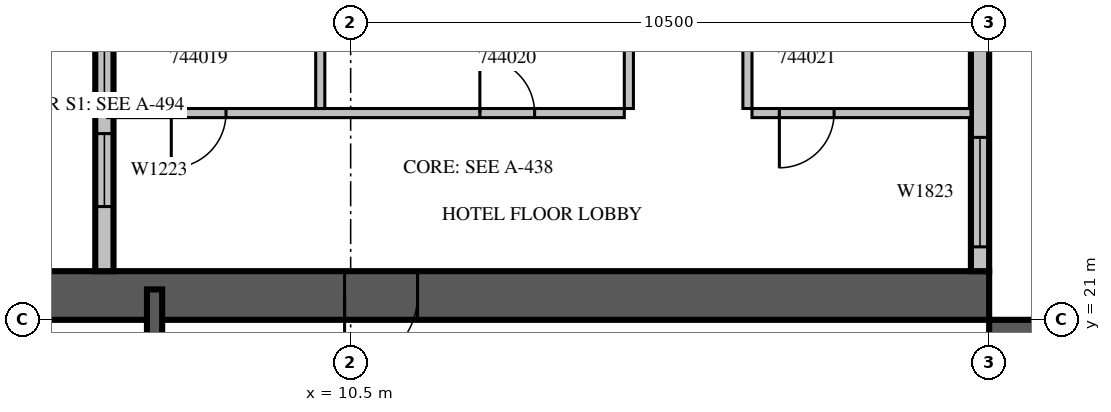
"""IFC4 building model, lengths in metres.
Left out: names, types, materials, properties, quantities, classifications, styles, units other than length and angle.
Written with IfcOpenShell. Run it as: python <this file> out.ifc"""

import sys

from ifc_helpers import new_model, si_unit, direction, frame, frame_2d, origin, place, context, subcontext, project, spatial, rectangle, extrude, source, transform, mapped, element, fill, save


model = new_model("IFC4")
c1 = context("Model", 3, precision=1e-05, world=origin(), true_north=direction((0.0, 1.0)))
c2 = subcontext(c1, "Body", "Model", "MODEL_VIEW")
j1 = project(units=[si_unit("LENGTHUNIT", "METRE"), si_unit("PLANEANGLEUNIT", "RADIAN")], contexts=[c1])
p1 = place(None, origin())
s1 = spatial("IfcSite", under=j1, at=p1, CompositionType="ELEMENT")
p2 = place(p1, origin())
s2 = spatial("IfcBuilding", under=s1, at=p2, CompositionType="ELEMENT")
p3 = place(p2, frame((0.0, 0.0, 200.6)))
s3 = spatial("IfcBuildingStorey", under=s2, at=p3, CompositionType="ELEMENT", Elevation=200.6)
m1 = source(origin(), c2, "Body", "SweptSolid", [
    extrude(rectangle(XDim=16.8, YDim=0.8, at=frame_2d((8.4, 0.0))), origin(), (0.0, 0.0, 1.0), 3.8),
])
p4 = place(p3, frame((21.4, 4.2, 0.0), z_axis=(0.0, 0.0, 1.0), x_axis=(0.0, 1.0, 0.0)))
e1 = element("IfcWall", 1, at=p4, inside=s3, PredefinedType="SHEAR", context=c2, shape_type="MappedRepresentation", body=[
    mapped(m1, transform((0.0, 0.0, 0.0), scale=1.0)),
])
m2 = source(origin(), c2, "Body", "SweptSolid", [
    extrude(rectangle(XDim=2.2, YDim=2.1, at=frame_2d((1.1, 1.05))), frame((0.0, 0.41, 0.0), z_axis=(0.0, -1.0, 0.0), x_axis=(1.0, 0.0, 0.0)), (0.0, 0.0, 1.0), 0.82),
])
p5 = place(p4, frame((4.2, 0.0, 0.0)))
e2 = element("IfcOpeningElement", 2, at=p5, cuts=e1, PredefinedType="OPENING", context=c2, shape_type="MappedRepresentation", body=[
    mapped(m2, transform((0.0, 0.0, 0.0), scale=1.0)),
])
m3 = source(origin(), c2, "Body", "SweptSolid", [
    extrude(rectangle(XDim=1.2, YDim=2.1, at=frame_2d((0.6, 1.05))), frame((0.0, 0.41, 0.0), z_axis=(0.0, -1.0, 0.0), x_axis=(1.0, 0.0, 0.0)), (0.0, 0.0, 1.0), 0.82),
])
p6 = place(p4, frame((14.7, 0.0, 0.0)))
e3 = element("IfcOpeningElement", 3, at=p6, cuts=e1, PredefinedType="OPENING", context=c2, shape_type="MappedRepresentation", body=[
    mapped(m3, transform((0.0, 0.0, 0.0), scale=1.0)),
])
p7 = place(p3, frame((4.2, 21.4, 0.0), z_axis=(0.0, 0.0, 1.0), x_axis=(1.0, 0.0, 0.0)))
e4 = element("IfcWall", 4, at=p7, inside=s3, PredefinedType="SHEAR", context=c2, shape_type="MappedRepresentation", body=[
    mapped(m1, transform((0.0, 0.0, 0.0), scale=1.0)),
])
p8 = place(p7, frame((6.2, 0.0, 0.0)))
e5 = element("IfcOpeningElement", 5, at=p8, cuts=e4, PredefinedType="OPENING", context=c2, shape_type="MappedRepresentation", body=[
    mapped(m3, transform((0.0, 0.0, 0.0), scale=1.0)),
])
m4 = source(origin(), c2, "Body", "SweptSolid", [
    extrude(rectangle(XDim=7.15, YDim=0.3, at=frame_2d((3.575, 0.0))), origin(), (0.0, 0.0, 1.0), 3.4),
])
p9 = place(p3, frame((20.85, 21.8, 0.0), z_axis=(0.0, 0.0, 1.0), x_axis=(0.0, 1.0, 0.0)))
e6 = element("IfcWall", 6, at=p9, inside=s3, PredefinedType="STANDARD", context=c2, shape_type="MappedRepresentation", body=[
    mapped(m4, transform((0.0, 0.0, 0.0), scale=1.0)),
])
m5 = source(origin(), c2, "Body", "SweptSolid", [
    extrude(rectangle(XDim=1.8, YDim=2.3, at=frame_2d((0.9, 1.15))), frame((0.0, 0.16, 0.0), z_axis=(0.0, -1.0, 0.0), x_axis=(1.0, 0.0, 0.0)), (0.0, 0.0, 1.0), 0.32),
])
p10 = place(p9, frame((0.4, 0.0, 0.6)))
e7 = element("IfcOpeningElement", 7, at=p10, cuts=e6, PredefinedType="OPENING", context=c2, shape_type="MappedRepresentation", body=[
    mapped(m5, transform((0.0, 0.0, 0.0), scale=1.0)),
])
m6 = source(origin(), c2, "Body", "SweptSolid", [
    extrude(rectangle(XDim=3.0, YDim=2.3, at=frame_2d((1.5, 1.15))), frame((0.0, 0.16, 0.0), z_axis=(0.0, -1.0, 0.0), x_axis=(1.0, 0.0, 0.0)), (0.0, 0.0, 1.0), 0.32),
])
p11 = place(p9, frame((4.0, 0.0, 0.6)))
e8 = element("IfcOpeningElement", 8, at=p11, cuts=e6, PredefinedType="OPENING", context=c2, shape_type="MappedRepresentation", body=[
    mapped(m6, transform((0.0, 0.0, 0.0), scale=1.0)),
])
m7 = source(origin(), c2, "Body", "SweptSolid", [
    extrude(rectangle(XDim=16.6, YDim=0.3, at=frame_2d((8.3, 0.0))), origin(), (0.0, 0.0, 1.0), 3.4),
])
p12 = place(p3, frame((6.45, 38.4, 0.0), z_axis=(0.0, 0.0, 1.0), x_axis=(0.0, -1.0, 0.0)))
e9 = element("IfcWall", 9, at=p12, inside=s3, PredefinedType="STANDARD", context=c2, shape_type="MappedRepresentation", body=[
    mapped(m7, transform((0.0, 0.0, 0.0), scale=1.0)),
])
p13 = place(p12, frame((1.15, 0.0, 0.6)))
e10 = element("IfcOpeningElement", 10, at=p13, cuts=e9, PredefinedType="OPENING", context=c2, shape_type="MappedRepresentation", body=[
    mapped(m5, transform((0.0, 0.0, 0.0), scale=1.0)),
])
p14 = place(p12, frame((9.438, 0.0, 0.6)))
e11 = element("IfcOpeningElement", 11, at=p14, cuts=e9, PredefinedType="OPENING", context=c2, shape_type="MappedRepresentation", body=[
    mapped(m5, transform((0.0, 0.0, 0.0), scale=1.0)),
])
m8 = source(origin(), c2, "Body", "SweptSolid", [
    extrude(rectangle(XDim=1.2, YDim=2.3, at=frame_2d((0.6, 1.15))), frame((0.0, 0.16, 0.0), z_axis=(0.0, -1.0, 0.0), x_axis=(1.0, 0.0, 0.0)), (0.0, 0.0, 1.0), 0.32),
])
p15 = place(p12, frame((14.338, 0.0, 0.6)))
e12 = element("IfcOpeningElement", 12, at=p15, cuts=e9, PredefinedType="OPENING", context=c2, shape_type="MappedRepresentation", body=[
    mapped(m8, transform((0.0, 0.0, 0.0), scale=1.0)),
])
p16 = place(p12, frame((11.887, 0.0, 0.6)))
e13 = element("IfcOpeningElement", 13, at=p16, cuts=e9, PredefinedType="OPENING", context=c2, shape_type="MappedRepresentation", body=[
    mapped(m5, transform((0.0, 0.0, 0.0), scale=1.0)),
])
m9 = source(origin(), c2, "Body", "SweptSolid", [
    extrude(rectangle(XDim=1.0, YDim=2.1, at=frame_2d((0.5, 1.05))), frame((0.0, 0.16, 0.0), z_axis=(0.0, -1.0, 0.0), x_axis=(1.0, 0.0, 0.0)), (0.0, 0.0, 1.0), 0.32),
])
p17 = place(p12, frame((5.908, 0.0, 0.0)))
e14 = element("IfcOpeningElement", 14, at=p17, cuts=e9, PredefinedType="OPENING", context=c2, shape_type="MappedRepresentation", body=[
    mapped(m9, transform((0.0, 0.0, 0.0), scale=1.0)),
])
m10 = source(origin(), c2, "Body", "SweptSolid", [
    extrude(rectangle(XDim=6.6, YDim=0.25, at=frame_2d((3.3, 0.0))), origin(), (0.0, 0.0, 1.0), 3.4),
])
p18 = place(p3, frame((7.275, 14.9, 0.0), z_axis=(0.0, 0.0, 1.0), x_axis=(0.0, 1.0, 0.0)))
e15 = element("IfcWall", 15, at=p18, inside=s3, PredefinedType="SOLIDWALL", context=c2, shape_type="MappedRepresentation", body=[
    mapped(m10, transform((0.0, 0.0, 0.0), scale=1.0)),
])
m11 = source(origin(), c2, "Body", "SweptSolid", [
    extrude(rectangle(XDim=1.1, YDim=2.1, at=frame_2d((0.55, 1.05))), frame((0.0, 0.135, 0.0), z_axis=(0.0, -1.0, 0.0), x_axis=(1.0, 0.0, 0.0)), (0.0, 0.0, 1.0), 0.27),
])
p19 = place(p18, frame((0.15, 0.0, 0.0)))
e16 = element("IfcOpeningElement", 16, at=p19, cuts=e15, PredefinedType="OPENING", context=c2, shape_type="MappedRepresentation", body=[
    mapped(m11, transform((0.0, 0.0, 0.0), scale=1.0)),
])
m12 = source(origin(), c2, "Body", "SweptSolid", [
    extrude(rectangle(XDim=8.495, YDim=0.15, at=frame_2d((4.247, 0.0))), origin(), (0.0, 0.0, 1.0), 3.4),
])
p20 = place(p3, frame((6.505, 24.4, 0.0), z_axis=(0.0, 0.0, 1.0), x_axis=(1.0, 0.0, 0.0)))
e17 = element("IfcWall", 17, at=p20, inside=s3, PredefinedType="PARTITIONING", context=c2, shape_type="MappedRepresentation", body=[
    mapped(m12, transform((0.0, 0.0, 0.0), scale=1.0)),
])
m13 = source(origin(), c2, "Body", "SweptSolid", [
    extrude(rectangle(XDim=0.9, YDim=2.1, at=frame_2d((0.45, 1.05))), frame((0.0, 0.085, 0.0), z_axis=(0.0, -1.0, 0.0), x_axis=(1.0, 0.0, 0.0)), (0.0, 0.0, 1.0), 0.17),
])
p21 = place(p20, frame((1.045, 0.0, 0.0)))
e18 = element("IfcOpeningElement", 18, at=p21, cuts=e17, PredefinedType="OPENING", context=c2, shape_type="MappedRepresentation", body=[
    mapped(m13, transform((0.0, 0.0, 0.0), scale=1.0)),
])
p22 = place(p20, frame((6.12, 0.0, 0.0)))
e19 = element("IfcOpeningElement", 19, at=p22, cuts=e17, PredefinedType="OPENING", context=c2, shape_type="MappedRepresentation", body=[
    mapped(m13, transform((0.0, 0.0, 0.0), scale=1.0)),
])
m14 = source(origin(), c2, "Body", "SweptSolid", [
    extrude(rectangle(XDim=3.6, YDim=0.15, at=frame_2d((1.8, 0.0))), origin(), (0.0, 0.0, 1.0), 3.4),
])
p23 = place(p3, frame((17.1, 24.4, 0.0), z_axis=(0.0, 0.0, 1.0), x_axis=(1.0, 0.0, 0.0)))
e20 = element("IfcWall", 20, at=p23, inside=s3, PredefinedType="PARTITIONING", context=c2, shape_type="MappedRepresentation", body=[
    mapped(m14, transform((0.0, 0.0, 0.0), scale=1.0)),
])
p24 = place(p23, frame((0.45, 0.0, 0.0)))
e21 = element("IfcOpeningElement", 21, at=p24, cuts=e20, PredefinedType="OPENING", context=c2, shape_type="MappedRepresentation", body=[
    mapped(m13, transform((0.0, 0.0, 0.0), scale=1.0)),
])
m15 = source(origin(), c2, "Body", "SweptSolid", [
    extrude(rectangle(XDim=4.85, YDim=0.15, at=frame_2d((2.425, 0.0))), origin(), (0.0, 0.0, 1.0), 3.4),
])
for number, where, z_axis, x_axis in (
    (22, (10.0, 24.475, 0.0), (0.0, 0.0, 1.0), (0.0, 1.0, 0.0)),
    (23, (15.075, 24.475, 0.0), (0.0, 0.0, 1.0), (0.0, 1.0, 0.0)),
    (24, (17.025, 29.325, 0.0), (0.0, 0.0, 1.0), (0.0, -1.0, 0.0)),
):
    element("IfcWall", number, at=place(p3, frame(where, z_axis=z_axis, x_axis=x_axis)), inside=s3, PredefinedType="PARTITIONING", context=c2, shape_type="MappedRepresentation", body=[
        mapped(m15, transform((0.0, 0.0, 0.0), scale=1.0)),
    ])
m16 = source(origin(), c2, "Body", "SweptSolid", [
    extrude(rectangle(XDim=1.8, YDim=2.3, at=frame_2d((0.9, 1.15))), frame((0.0, 0.03, 0.0), z_axis=(0.0, -1.0, 0.0), x_axis=(1.0, 0.0, 0.0)), (0.0, 0.0, 1.0), 0.06),
])
p25 = place(p10, origin())
e25 = element("IfcWindow", 25, at=p25, inside=s3, PartitioningType="SINGLE_PANEL", PredefinedType="WINDOW", context=c2, shape_type="MappedRepresentation", body=[
    mapped(m16, transform((0.0, 0.0, 0.0), scale=1.0)),
])
fill(e7, e25)
m17 = source(origin(), c2, "Body", "SweptSolid", [
    extrude(rectangle(XDim=1.2, YDim=2.3, at=frame_2d((0.6, 1.15))), frame((0.0, 0.03, 0.0), z_axis=(0.0, -1.0, 0.0), x_axis=(1.0, 0.0, 0.0)), (0.0, 0.0, 1.0), 0.06),
])
p26 = place(p15, origin())
e26 = element("IfcWindow", 26, at=p26, inside=s3, PartitioningType="SINGLE_PANEL", PredefinedType="WINDOW", context=c2, shape_type="MappedRepresentation", body=[
    mapped(m17, transform((0.0, 0.0, 0.0), scale=1.0)),
])
fill(e12, e26)
p27 = place(p16, origin())
e27 = element("IfcWindow", 27, at=p27, inside=s3, PartitioningType="SINGLE_PANEL", PredefinedType="WINDOW", context=c2, shape_type="MappedRepresentation", body=[
    mapped(m16, transform((0.0, 0.0, 0.0), scale=1.0)),
])
fill(e13, e27)
m18 = source(origin(), c2, "Body", "SweptSolid", [
    extrude(rectangle(XDim=1.2, YDim=2.1, at=frame_2d((0.6, 1.05))), frame((0.0, 0.025, 0.0), z_axis=(0.0, -1.0, 0.0), x_axis=(1.0, 0.0, 0.0)), (0.0, 0.0, 1.0), 0.05),
])
p28 = place(p8, origin())
e28 = element("IfcDoor", 28, at=p28, inside=s3, OperationType="SINGLE_SWING_RIGHT", PredefinedType="DOOR", context=c2, shape_type="MappedRepresentation", body=[
    mapped(m18, transform((0.0, 0.0, 0.0), scale=1.0)),
])
fill(e5, e28)
m19 = source(origin(), c2, "Body", "SweptSolid", [
    extrude(rectangle(XDim=0.9, YDim=2.1, at=frame_2d((0.45, 1.05))), frame((0.0, 0.025, 0.0), z_axis=(0.0, -1.0, 0.0), x_axis=(1.0, 0.0, 0.0)), (0.0, 0.0, 1.0), 0.05),
])
p29 = place(p21, origin())
e29 = element("IfcDoor", 29, at=p29, inside=s3, OperationType="SINGLE_SWING_RIGHT", PredefinedType="DOOR", context=c2, shape_type="MappedRepresentation", body=[
    mapped(m19, transform((0.0, 0.0, 0.0), scale=1.0)),
])
fill(e18, e29)
p30 = place(p22, origin())
e30 = element("IfcDoor", 30, at=p30, inside=s3, OperationType="SINGLE_SWING_LEFT", PredefinedType="DOOR", context=c2, shape_type="MappedRepresentation", body=[
    mapped(m19, transform((0.0, 0.0, 0.0), scale=1.0)),
])
fill(e19, e30)
p31 = place(p24, origin())
e31 = element("IfcDoor", 31, at=p31, inside=s3, OperationType="SINGLE_SWING_RIGHT", PredefinedType="DOOR", context=c2, shape_type="MappedRepresentation", body=[
    mapped(m19, transform((0.0, 0.0, 0.0), scale=1.0)),
])
fill(e21, e31)
save(model, sys.argv[1])
